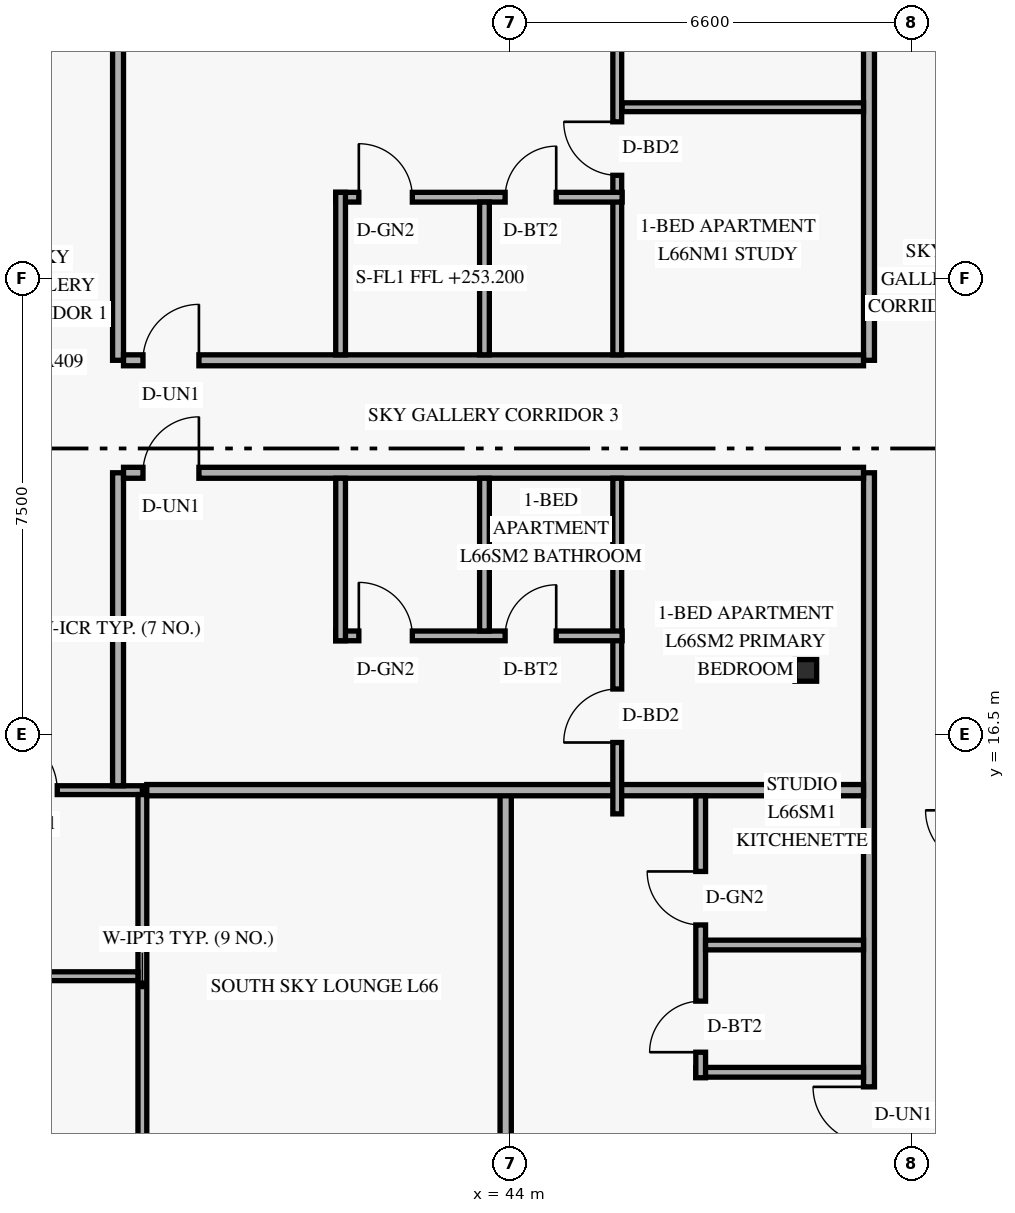
"""IFC4 building model, lengths in metres.
Left out: names, types, materials, properties, quantities, classifications, styles, units other than length and angle.
Written with IfcOpenShell. Run it as: python <this file> out.ifc"""

import sys

from ifc_helpers import new_model, si_unit, direction, frame, frame_2d, origin, origin_2d, place, context, subcontext, project, spatial, rectangle, hollow_rectangle, extrude, element, fill, save


model = new_model("IFC4")
c1 = context("Model", 3, precision=1e-05, world=origin(), true_north=direction((0.0, 1.0)))
c2 = subcontext(c1, "Body", "Model", "MODEL_VIEW")
j1 = project(units=[si_unit("LENGTHUNIT", "METRE"), si_unit("PLANEANGLEUNIT", "RADIAN")], contexts=[c1])
p1 = place(None, origin())
s1 = spatial("IfcSite", under=j1, at=p1, CompositionType="ELEMENT")
p2 = place(p1, origin())
s2 = spatial("IfcBuilding", under=s1, at=p2, CompositionType="ELEMENT")
p3 = place(p2, frame((0.0, 0.0, 253.2)))
s3 = spatial("IfcBuildingStorey", under=s2, at=p3, CompositionType="ELEMENT", Elevation=253.2)
p4 = place(p3, frame((48.798, 17.55, 0.0), z_axis=(0.034971136209, 0.0, 0.999388322742), x_axis=(0.0, 1.0, 0.0)))
e1 = element("IfcColumn", 1, at=p4, inside=s3, PredefinedType="COLUMN", context=c2, shape_type="SweptSolid", body=[
    extrude(hollow_rectangle(XDim=0.356, YDim=0.356, WallThickness=0.016, at=origin_2d()), origin(), (0.0, 0.0, 1.0), 3.602),
])
p5 = place(p3, frame((32.722, 15.58, 0.0), z_axis=(0.0, 0.0, 1.0), x_axis=(1.0, 0.0, 0.0)))
e2 = element("IfcWall", 2, at=p5, inside=s3, PredefinedType="PARTITIONING", context=c2, shape_type="SweptSolid", body=[
    extrude(rectangle(XDim=5.228, YDim=0.145, at=frame_2d((2.614, 0.0))), origin(), (0.0, 0.0, 1.0), 2.803),
])
p6 = place(p5, frame((2.877, 0.0, 0.0)))
e3 = element("IfcOpeningElement", 3, at=p6, cuts=e2, PredefinedType="OPENING", context=c2, shape_type="SweptSolid", body=[
    extrude(rectangle(XDim=0.95, YDim=2.15, at=frame_2d((0.475, 1.075))), frame((0.0, 0.083, 0.0), z_axis=(0.0, -1.0, 0.0), x_axis=(1.0, 0.0, 0.0)), (0.0, 0.0, 1.0), 0.165),
])
p7 = place(p3, frame((37.95, 9.25, 0.0), z_axis=(0.0, 0.0, 1.0), x_axis=(0.0, 1.0, 0.0)))
e4 = element("IfcWall", 4, at=p7, inside=s3, PredefinedType="PARTITIONING", context=c2, shape_type="SweptSolid", body=[
    extrude(rectangle(XDim=6.258, YDim=0.145, at=frame_2d((3.129, 0.0))), origin(), (0.0, 0.0, 1.0), 2.803),
])
p8 = place(p3, frame((32.722, 12.52, 0.0), z_axis=(0.0, 0.0, 1.0), x_axis=(1.0, 0.0, 0.0)))
e5 = element("IfcWall", 5, at=p8, inside=s3, PredefinedType="PARTITIONING", context=c2, shape_type="SweptSolid", body=[
    extrude(rectangle(XDim=5.155, YDim=0.145, at=frame_2d((2.578, 0.0))), origin(), (0.0, 0.0, 1.0), 2.803),
])
p9 = place(p8, frame((2.778, 0.0, 0.0)))
e6 = element("IfcOpeningElement", 6, at=p9, cuts=e5, PredefinedType="OPENING", context=c2, shape_type="SweptSolid", body=[
    extrude(rectangle(XDim=0.9, YDim=2.1, at=frame_2d((0.45, 1.05))), frame((0.0, 0.083, 0.0), z_axis=(0.0, -1.0, 0.0), x_axis=(1.0, 0.0, 0.0)), (0.0, 0.0, 1.0), 0.165),
])
p10 = place(p3, frame((37.55, 15.653, 0.0), z_axis=(0.0, 0.0, 1.0), x_axis=(0.0, 1.0, 0.0)))
e7 = element("IfcWall", 7, at=p10, inside=s3, PredefinedType="STANDARD", context=c2, shape_type="SweptSolid", body=[
    extrude(rectangle(XDim=5.147, YDim=0.18, at=frame_2d((2.574, 0.0))), origin(), (0.0, 0.0, 1.0), 2.803),
])
p11 = place(p3, frame((37.55, 22.65, 0.0), z_axis=(0.0, 0.0, 1.0), x_axis=(0.0, 1.0, 0.0)))
e8 = element("IfcWall", 8, at=p11, inside=s3, PredefinedType="STANDARD", context=c2, shape_type="SweptSolid", body=[
    extrude(rectangle(XDim=8.628, YDim=0.18, at=frame_2d((4.314, 0.0))), origin(), (0.0, 0.0, 1.0), 2.803),
])
p12 = place(p3, frame((49.9, 5.77, 0.0), z_axis=(0.0, 0.0, 1.0), x_axis=(0.0, 1.0, 0.0)))
e9 = element("IfcWall", 9, at=p12, inside=s3, PredefinedType="STANDARD", context=c2, shape_type="SweptSolid", body=[
    extrude(rectangle(XDim=15.03, YDim=0.18, at=frame_2d((7.515, 0.0))), origin(), (0.0, 0.0, 1.0), 2.803),
])
p13 = place(p12, frame((4.01, 0.0, 0.0)))
e10 = element("IfcOpeningElement", 10, at=p13, cuts=e9, PredefinedType="OPENING", context=c2, shape_type="SweptSolid", body=[
    extrude(rectangle(XDim=0.92, YDim=2.15, at=frame_2d((0.46, 1.075))), frame((0.0, 0.1, 0.0), z_axis=(0.0, -1.0, 0.0), x_axis=(1.0, 0.0, 0.0)), (0.0, 0.0, 1.0), 0.2),
])
p14 = place(p3, frame((49.9, 22.65, 0.0), z_axis=(0.0, 0.0, 1.0), x_axis=(0.0, 1.0, 0.0)))
e11 = element("IfcWall", 11, at=p14, inside=s3, PredefinedType="STANDARD", context=c2, shape_type="SweptSolid", body=[
    extrude(rectangle(XDim=19.58, YDim=0.18, at=frame_2d((9.79, 0.0))), origin(), (0.0, 0.0, 1.0), 2.803),
])
p15 = place(p14, frame((13.7, 0.0, 0.0)))
e12 = element("IfcOpeningElement", 12, at=p15, cuts=e11, PredefinedType="OPENING", context=c2, shape_type="SweptSolid", body=[
    extrude(rectangle(XDim=0.92, YDim=2.15, at=frame_2d((0.46, 1.075))), frame((0.0, 0.1, 0.0), z_axis=(0.0, -1.0, 0.0), x_axis=(1.0, 0.0, 0.0)), (0.0, 0.0, 1.0), 0.2),
])
p16 = place(p3, frame((37.64, 20.8, 0.0), z_axis=(0.0, 0.0, 1.0), x_axis=(1.0, 0.0, 0.0)))
e13 = element("IfcWall", 13, at=p16, inside=s3, PredefinedType="STANDARD", context=c2, shape_type="SweptSolid", body=[
    extrude(rectangle(XDim=12.17, YDim=0.18, at=frame_2d((6.085, 0.0))), origin(), (0.0, 0.0, 1.0), 2.803),
])
p17 = place(p16, frame((0.32, 0.0, 0.0)))
e14 = element("IfcOpeningElement", 14, at=p17, cuts=e13, PredefinedType="OPENING", context=c2, shape_type="SweptSolid", body=[
    extrude(rectangle(XDim=0.92, YDim=2.15, at=frame_2d((0.46, 1.075))), frame((0.0, 0.1, 0.0), z_axis=(0.0, -1.0, 0.0), x_axis=(1.0, 0.0, 0.0)), (0.0, 0.0, 1.0), 0.2),
])
p18 = place(p3, frame((37.64, 22.65, 0.0), z_axis=(0.0, 0.0, 1.0), x_axis=(1.0, 0.0, 0.0)))
e15 = element("IfcWall", 15, at=p18, inside=s3, PredefinedType="STANDARD", context=c2, shape_type="SweptSolid", body=[
    extrude(rectangle(XDim=12.17, YDim=0.18, at=frame_2d((6.085, 0.0))), origin(), (0.0, 0.0, 1.0), 2.803),
])
p19 = place(p18, frame((0.32, 0.0, 0.0)))
e16 = element("IfcOpeningElement", 16, at=p19, cuts=e15, PredefinedType="OPENING", context=c2, shape_type="SweptSolid", body=[
    extrude(rectangle(XDim=0.92, YDim=2.15, at=frame_2d((0.46, 1.075))), frame((0.0, 0.1, 0.0), z_axis=(0.0, -1.0, 0.0), x_axis=(1.0, 0.0, 0.0)), (0.0, 0.0, 1.0), 0.2),
])
p20 = place(p3, frame((43.925, 5.77, 0.0), z_axis=(0.0, 0.0, 1.0), x_axis=(0.0, 1.0, 0.0)))
e17 = element("IfcWall", 17, at=p20, inside=s3, PredefinedType="PARTITIONING", context=c2, shape_type="SweptSolid", body=[
    extrude(rectangle(XDim=9.81, YDim=0.185, at=frame_2d((4.905, 0.0))), origin(), (0.0, 0.0, 1.0), 2.803),
])
p21 = place(p3, frame((38.022, 15.58, 0.0), z_axis=(0.0, 0.0, 1.0), x_axis=(1.0, 0.0, 0.0)))
e18 = element("IfcWall", 18, at=p21, inside=s3, PredefinedType="PARTITIONING", context=c2, shape_type="SweptSolid", body=[
    extrude(rectangle(XDim=11.788, YDim=0.185, at=frame_2d((5.894, 0.0))), origin(), (0.0, 0.0, 1.0), 2.803),
])
p22 = place(p3, frame((47.052, 10.94, 0.0), z_axis=(0.0, 0.0, 1.0), x_axis=(1.0, 0.0, 0.0)))
e19 = element("IfcWall", 19, at=p22, inside=s3, PredefinedType="PLUMBINGWALL", context=c2, shape_type="SweptSolid", body=[
    extrude(rectangle(XDim=2.758, YDim=0.16, at=frame_2d((1.379, 0.0))), origin(), (0.0, 0.0, 1.0), 2.803),
])
p23 = place(p3, frame((47.132, 10.85, 0.0), z_axis=(0.0, 0.0, 1.0), x_axis=(0.0, 1.0, 0.0)))
e20 = element("IfcWall", 20, at=p23, inside=s3, PredefinedType="PLUMBINGWALL", context=c2, shape_type="SweptSolid", body=[
    extrude(rectangle(XDim=4.637, YDim=0.16, at=frame_2d((2.319, 0.0))), origin(), (0.0, 0.0, 1.0), 3.039),
])
p24 = place(p23, frame((0.42, 0.0, 0.0)))
e21 = element("IfcOpeningElement", 21, at=p24, cuts=e20, PredefinedType="OPENING", context=c2, shape_type="SweptSolid", body=[
    extrude(rectangle(XDim=0.84, YDim=2.12, at=frame_2d((0.42, 1.06))), frame((0.0, 0.09, 0.0), z_axis=(0.0, -1.0, 0.0), x_axis=(1.0, 0.0, 0.0)), (0.0, 0.0, 1.0), 0.18),
])
p25 = place(p23, frame((2.513, 0.0, 0.0)))
e22 = element("IfcOpeningElement", 22, at=p25, cuts=e20, PredefinedType="OPENING", context=c2, shape_type="SweptSolid", body=[
    extrude(rectangle(XDim=0.88, YDim=2.12, at=frame_2d((0.44, 1.06))), frame((0.0, 0.09, 0.0), z_axis=(0.0, -1.0, 0.0), x_axis=(1.0, 0.0, 0.0)), (0.0, 0.0, 1.0), 0.18),
])
p26 = place(p3, frame((47.212, 13.033, 0.0), z_axis=(0.0, 0.0, 1.0), x_axis=(1.0, 0.0, 0.0)))
e23 = element("IfcWall", 23, at=p26, inside=s3, PredefinedType="PLUMBINGWALL", context=c2, shape_type="SweptSolid", body=[
    extrude(rectangle(XDim=2.598, YDim=0.16, at=frame_2d((1.299, 0.0))), origin(), (0.0, 0.0, 1.0), 2.803),
])
p27 = place(p3, frame((45.76, 15.19, 0.0), z_axis=(0.0, 0.0, 1.0), x_axis=(0.0, 1.0, 0.0)))
e24 = element("IfcWall", 24, at=p27, inside=s3, PredefinedType="PARTITIONING", context=c2, shape_type="SweptSolid", body=[
    extrude(rectangle(XDim=5.52, YDim=0.145, at=frame_2d((2.76, 0.0))), origin(), (0.0, 0.0, 1.0), 2.803),
])
p28 = place(p27, frame((1.174, 0.0, 0.0)))
e25 = element("IfcOpeningElement", 25, at=p28, cuts=e24, PredefinedType="OPENING", context=c2, shape_type="SweptSolid", body=[
    extrude(rectangle(XDim=0.88, YDim=2.14, at=frame_2d((0.44, 1.07))), frame((0.0, 0.083, 0.0), z_axis=(0.0, -1.0, 0.0), x_axis=(1.0, 0.0, 0.0)), (0.0, 0.0, 1.0), 0.165),
])
p29 = place(p3, frame((41.13, 18.117, 0.0), z_axis=(0.0, 0.0, 1.0), x_axis=(1.0, 0.0, 0.0)))
e26 = element("IfcWall", 26, at=p29, inside=s3, PredefinedType="PLUMBINGWALL", context=c2, shape_type="SweptSolid", body=[
    extrude(rectangle(XDim=4.71, YDim=0.16, at=frame_2d((2.355, 0.0))), origin(), (0.0, 0.0, 1.0), 3.36),
])
p30 = place(p29, frame((0.38, 0.0, 0.0)))
e27 = element("IfcOpeningElement", 27, at=p30, cuts=e26, PredefinedType="OPENING", context=c2, shape_type="SweptSolid", body=[
    extrude(rectangle(XDim=0.88, YDim=2.12, at=frame_2d((0.44, 1.06))), frame((0.0, 0.09, 0.0), z_axis=(0.0, -1.0, 0.0), x_axis=(1.0, 0.0, 0.0)), (0.0, 0.0, 1.0), 0.18),
])
p31 = place(p29, frame((2.786, 0.0, 0.0)))
e28 = element("IfcOpeningElement", 28, at=p31, cuts=e26, PredefinedType="OPENING", context=c2, shape_type="SweptSolid", body=[
    extrude(rectangle(XDim=0.84, YDim=2.12, at=frame_2d((0.42, 1.06))), frame((0.0, 0.09, 0.0), z_axis=(0.0, -1.0, 0.0), x_axis=(1.0, 0.0, 0.0)), (0.0, 0.0, 1.0), 0.18),
])
p32 = place(p3, frame((41.21, 18.038, 0.0), z_axis=(0.0, 0.0, 1.0), x_axis=(0.0, 1.0, 0.0)))
e29 = element("IfcWall", 29, at=p32, inside=s3, PredefinedType="PLUMBINGWALL", context=c2, shape_type="SweptSolid", body=[
    extrude(rectangle(XDim=2.672, YDim=0.16, at=frame_2d((1.336, 0.0))), origin(), (0.0, 0.0, 1.0), 3.36),
])
p33 = place(p3, frame((43.576, 18.198, 0.0), z_axis=(0.0, 0.0, 1.0), x_axis=(0.0, 1.0, 0.0)))
e30 = element("IfcWall", 30, at=p33, inside=s3, PredefinedType="PLUMBINGWALL", context=c2, shape_type="SweptSolid", body=[
    extrude(rectangle(XDim=2.512, YDim=0.16, at=frame_2d((1.256, 0.0))), origin(), (0.0, 0.0, 1.0), 3.36),
])
p34 = place(p3, frame((45.76, 22.74, 0.0), z_axis=(0.0, 0.0, 1.0), x_axis=(0.0, 1.0, 0.0)))
e31 = element("IfcWall", 31, at=p34, inside=s3, PredefinedType="PARTITIONING", context=c2, shape_type="SweptSolid", body=[
    extrude(rectangle(XDim=9.0, YDim=0.145, at=frame_2d((4.5, 0.0))), origin(), (0.0, 0.0, 1.0), 2.803),
])
p35 = place(p34, frame((2.952, 0.0, 0.0)))
e32 = element("IfcOpeningElement", 32, at=p35, cuts=e31, PredefinedType="OPENING", context=c2, shape_type="SweptSolid", body=[
    extrude(rectangle(XDim=0.88, YDim=2.14, at=frame_2d((0.44, 1.07))), frame((0.0, 0.083, 0.0), z_axis=(0.0, -1.0, 0.0), x_axis=(1.0, 0.0, 0.0)), (0.0, 0.0, 1.0), 0.165),
])
p36 = place(p34, frame((5.901, 0.0, 0.0)))
e33 = element("IfcOpeningElement", 33, at=p36, cuts=e31, PredefinedType="OPENING", context=c2, shape_type="SweptSolid", body=[
    extrude(rectangle(XDim=0.88, YDim=2.12, at=frame_2d((0.44, 1.06))), frame((0.0, 0.083, 0.0), z_axis=(0.0, -1.0, 0.0), x_axis=(1.0, 0.0, 0.0)), (0.0, 0.0, 1.0), 0.165),
])
p37 = place(p3, frame((41.13, 25.333, 0.0), z_axis=(0.0, 0.0, 1.0), x_axis=(1.0, 0.0, 0.0)))
e34 = element("IfcWall", 34, at=p37, inside=s3, PredefinedType="PLUMBINGWALL", context=c2, shape_type="SweptSolid", body=[
    extrude(rectangle(XDim=4.71, YDim=0.16, at=frame_2d((2.355, 0.0))), origin(), (0.0, 0.0, 1.0), 3.36),
])
p38 = place(p37, frame((0.38, 0.0, 0.0)))
e35 = element("IfcOpeningElement", 35, at=p38, cuts=e34, PredefinedType="OPENING", context=c2, shape_type="SweptSolid", body=[
    extrude(rectangle(XDim=0.88, YDim=2.12, at=frame_2d((0.44, 1.06))), frame((0.0, 0.09, 0.0), z_axis=(0.0, -1.0, 0.0), x_axis=(1.0, 0.0, 0.0)), (0.0, 0.0, 1.0), 0.18),
])
p39 = place(p37, frame((2.786, 0.0, 0.0)))
e36 = element("IfcOpeningElement", 36, at=p39, cuts=e34, PredefinedType="OPENING", context=c2, shape_type="SweptSolid", body=[
    extrude(rectangle(XDim=0.84, YDim=2.12, at=frame_2d((0.42, 1.06))), frame((0.0, 0.09, 0.0), z_axis=(0.0, -1.0, 0.0), x_axis=(1.0, 0.0, 0.0)), (0.0, 0.0, 1.0), 0.18),
])
p40 = place(p3, frame((41.21, 22.74, 0.0), z_axis=(0.0, 0.0, 1.0), x_axis=(0.0, 1.0, 0.0)))
e37 = element("IfcWall", 37, at=p40, inside=s3, PredefinedType="PLUMBINGWALL", context=c2, shape_type="SweptSolid", body=[
    extrude(rectangle(XDim=2.673, YDim=0.16, at=frame_2d((1.336, 0.0))), origin(), (0.0, 0.0, 1.0), 3.36),
])
p41 = place(p3, frame((43.576, 22.74, 0.0), z_axis=(0.0, 0.0, 1.0), x_axis=(0.0, 1.0, 0.0)))
e38 = element("IfcWall", 38, at=p41, inside=s3, PredefinedType="PLUMBINGWALL", context=c2, shape_type="SweptSolid", body=[
    extrude(rectangle(XDim=2.512, YDim=0.16, at=frame_2d((1.256, 0.0))), origin(), (0.0, 0.0, 1.0), 3.36),
])
p42 = place(p3, frame((45.84, 26.812, 0.0), z_axis=(0.0, 0.0, 1.0), x_axis=(1.0, 0.0, 0.0)))
e39 = element("IfcWall", 39, at=p42, inside=s3, PredefinedType="PARTITIONING", context=c2, shape_type="SweptSolid", body=[
    extrude(rectangle(XDim=3.97, YDim=0.145, at=frame_2d((1.985, 0.0))), origin(), (0.0, 0.0, 1.0), 2.803),
])
p43 = place(p6, origin())
e40 = element("IfcDoor", 40, at=p43, inside=s3, OperationType="SINGLE_SWING_LEFT", PredefinedType="DOOR", context=c2, shape_type="SweptSolid", body=[
    extrude(rectangle(XDim=0.95, YDim=2.15, at=frame_2d((0.475, 1.075))), frame((0.0, 0.025, 0.0), z_axis=(0.0, -1.0, 0.0), x_axis=(1.0, 0.0, 0.0)), (0.0, 0.0, 1.0), 0.05),
])
fill(e3, e40)
p44 = place(p13, origin())
e41 = element("IfcDoor", 41, at=p44, inside=s3, OperationType="SINGLE_SWING_RIGHT", PredefinedType="DOOR", context=c2, shape_type="SweptSolid", body=[
    extrude(rectangle(XDim=0.92, YDim=2.15, at=frame_2d((0.46, 1.075))), frame((0.0, 0.025, 0.0), z_axis=(0.0, -1.0, 0.0), x_axis=(1.0, 0.0, 0.0)), (0.0, 0.0, 1.0), 0.05),
])
fill(e10, e41)
p45 = place(p24, origin())
e42 = element("IfcDoor", 42, at=p45, inside=s3, OperationType="SINGLE_SWING_LEFT", PredefinedType="DOOR", context=c2, shape_type="SweptSolid", body=[
    extrude(rectangle(XDim=0.84, YDim=2.12, at=frame_2d((0.42, 1.06))), frame((0.0, 0.025, 0.0), z_axis=(0.0, -1.0, 0.0), x_axis=(1.0, 0.0, 0.0)), (0.0, 0.0, 1.0), 0.05),
])
fill(e21, e42)
p46 = place(p25, origin())
e43 = element("IfcDoor", 43, at=p46, inside=s3, OperationType="SINGLE_SWING_RIGHT", PredefinedType="DOOR", context=c2, shape_type="SweptSolid", body=[
    extrude(rectangle(XDim=0.88, YDim=2.12, at=frame_2d((0.44, 1.06))), frame((0.0, 0.025, 0.0), z_axis=(0.0, -1.0, 0.0), x_axis=(1.0, 0.0, 0.0)), (0.0, 0.0, 1.0), 0.05),
])
fill(e22, e43)
p47 = place(p17, origin())
e44 = element("IfcDoor", 44, at=p47, inside=s3, OperationType="SINGLE_SWING_RIGHT", PredefinedType="DOOR", context=c2, shape_type="SweptSolid", body=[
    extrude(rectangle(XDim=0.92, YDim=2.15, at=frame_2d((0.46, 1.075))), frame((0.0, 0.025, 0.0), z_axis=(0.0, -1.0, 0.0), x_axis=(1.0, 0.0, 0.0)), (0.0, 0.0, 1.0), 0.05),
])
fill(e14, e44)
p48 = place(p30, origin())
e45 = element("IfcDoor", 45, at=p48, inside=s3, OperationType="SINGLE_SWING_LEFT", PredefinedType="DOOR", context=c2, shape_type="SweptSolid", body=[
    extrude(rectangle(XDim=0.88, YDim=2.12, at=frame_2d((0.44, 1.06))), frame((0.0, 0.025, 0.0), z_axis=(0.0, -1.0, 0.0), x_axis=(1.0, 0.0, 0.0)), (0.0, 0.0, 1.0), 0.05),
])
fill(e27, e45)
p49 = place(p31, origin())
e46 = element("IfcDoor", 46, at=p49, inside=s3, OperationType="SINGLE_SWING_RIGHT", PredefinedType="DOOR", context=c2, shape_type="SweptSolid", body=[
    extrude(rectangle(XDim=0.84, YDim=2.12, at=frame_2d((0.42, 1.06))), frame((0.0, 0.025, 0.0), z_axis=(0.0, -1.0, 0.0), x_axis=(1.0, 0.0, 0.0)), (0.0, 0.0, 1.0), 0.05),
])
fill(e28, e46)
p50 = place(p28, origin())
e47 = element("IfcDoor", 47, at=p50, inside=s3, OperationType="SINGLE_SWING_LEFT", PredefinedType="DOOR", context=c2, shape_type="SweptSolid", body=[
    extrude(rectangle(XDim=0.88, YDim=2.14, at=frame_2d((0.44, 1.07))), frame((0.0, 0.025, 0.0), z_axis=(0.0, -1.0, 0.0), x_axis=(1.0, 0.0, 0.0)), (0.0, 0.0, 1.0), 0.05),
])
fill(e25, e47)
p51 = place(p19, origin())
e48 = element("IfcDoor", 48, at=p51, inside=s3, OperationType="SINGLE_SWING_RIGHT", PredefinedType="DOOR", context=c2, shape_type="SweptSolid", body=[
    extrude(rectangle(XDim=0.92, YDim=2.15, at=frame_2d((0.46, 1.075))), frame((0.0, 0.025, 0.0), z_axis=(0.0, -1.0, 0.0), x_axis=(1.0, 0.0, 0.0)), (0.0, 0.0, 1.0), 0.05),
])
fill(e16, e48)
p52 = place(p38, origin())
e49 = element("IfcDoor", 49, at=p52, inside=s3, OperationType="SINGLE_SWING_LEFT", PredefinedType="DOOR", context=c2, shape_type="SweptSolid", body=[
    extrude(rectangle(XDim=0.88, YDim=2.12, at=frame_2d((0.44, 1.06))), frame((0.0, 0.025, 0.0), z_axis=(0.0, -1.0, 0.0), x_axis=(1.0, 0.0, 0.0)), (0.0, 0.0, 1.0), 0.05),
])
fill(e35, e49)
p53 = place(p39, origin())
e50 = element("IfcDoor", 50, at=p53, inside=s3, OperationType="SINGLE_SWING_RIGHT", PredefinedType="DOOR", context=c2, shape_type="SweptSolid", body=[
    extrude(rectangle(XDim=0.84, YDim=2.12, at=frame_2d((0.42, 1.06))), frame((0.0, 0.025, 0.0), z_axis=(0.0, -1.0, 0.0), x_axis=(1.0, 0.0, 0.0)), (0.0, 0.0, 1.0), 0.05),
])
fill(e36, e50)
p54 = place(p35, origin())
e51 = element("IfcDoor", 51, at=p54, inside=s3, OperationType="SINGLE_SWING_RIGHT", PredefinedType="DOOR", context=c2, shape_type="SweptSolid", body=[
    extrude(rectangle(XDim=0.88, YDim=2.14, at=frame_2d((0.44, 1.07))), frame((0.0, 0.025, 0.0), z_axis=(0.0, -1.0, 0.0), x_axis=(1.0, 0.0, 0.0)), (0.0, 0.0, 1.0), 0.05),
])
fill(e32, e51)
save(model, sys.argv[1])
